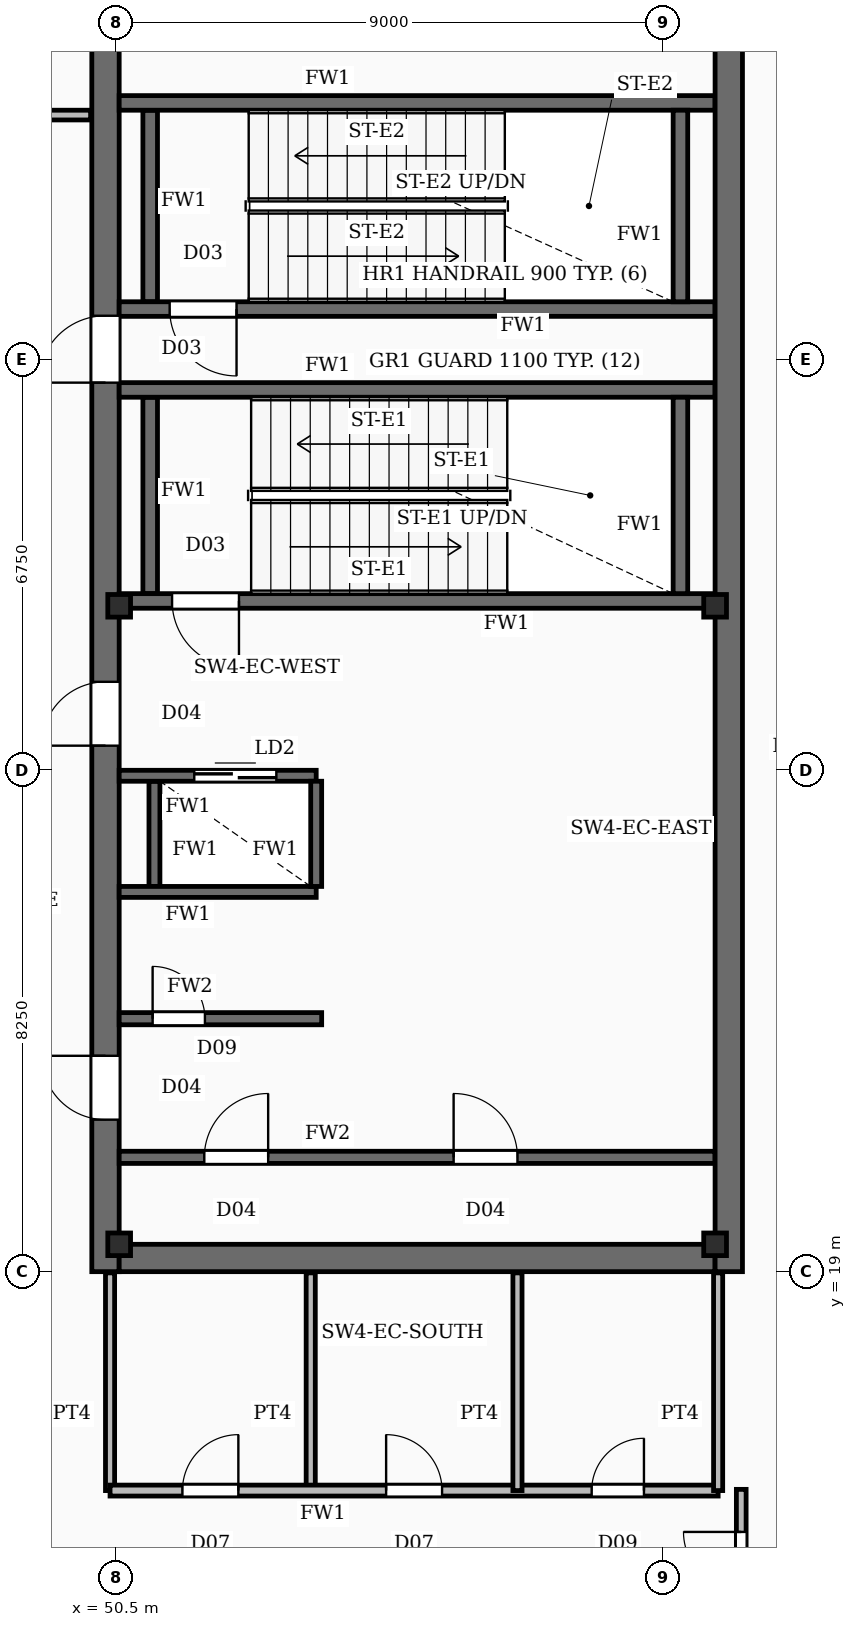
"""IFC4 building model, lengths in metres.
Left out: names, types, materials, properties, quantities, classifications, styles, units other than length and angle.
Written with IfcOpenShell. Run it as: python <this file> out.ifc"""

import sys

from ifc_helpers import new_model, si_unit, direction, frame, frame_2d, origin, origin_2d, place, context, subcontext, project, spatial, rectangle, i_section, extrude, element, fill, save


model = new_model("IFC4")
c1 = context("Model", 3, precision=1e-05, world=origin(), true_north=direction((0.0, 1.0)))
c2 = subcontext(c1, "Body", "Model", "MODEL_VIEW")
j1 = project(units=[si_unit("LENGTHUNIT", "METRE"), si_unit("PLANEANGLEUNIT", "RADIAN")], contexts=[c1])
p1 = place(None, origin())
s1 = spatial("IfcSite", under=j1, at=p1, CompositionType="ELEMENT")
p2 = place(p1, origin())
s2 = spatial("IfcBuilding", under=s1, at=p2, CompositionType="ELEMENT")
p3 = place(p2, frame((0.0, 0.0, 317.2)))
s3 = spatial("IfcBuildingStorey", under=s2, at=p3, CompositionType="ELEMENT", Elevation=317.2)
p4 = place(p3, frame((50.325, 19.0, -0.24), z_axis=(0.0, 0.0, 1.0), x_axis=(0.0, 1.0, 0.0)))
e1 = element("IfcWall", 1, at=p4, inside=s3, PredefinedType="SHEAR", context=c2, shape_type="SweptSolid", body=[
    extrude(rectangle(XDim=20.8, YDim=0.45, at=frame_2d((10.4, 0.0))), origin(), (0.0, 0.0, 1.0), 4.62),
])
p5 = place(p4, frame((2.5, 0.0, 0.24)))
e2 = element("IfcOpeningElement", 2, at=p5, cuts=e1, PredefinedType="OPENING", context=c2, shape_type="SweptSolid", body=[
    extrude(rectangle(XDim=1.05, YDim=2.15, at=frame_2d((0.525, 1.075))), frame((0.0, 0.235, 0.0), z_axis=(0.0, -1.0, 0.0), x_axis=(1.0, 0.0, 0.0)), (0.0, 0.0, 1.0), 0.47),
])
p6 = place(p4, frame((8.65, 0.0, 0.24)))
e3 = element("IfcOpeningElement", 3, at=p6, cuts=e1, PredefinedType="OPENING", context=c2, shape_type="SweptSolid", body=[
    extrude(rectangle(XDim=1.05, YDim=2.15, at=frame_2d((0.525, 1.075))), frame((0.0, 0.235, 0.0), z_axis=(0.0, -1.0, 0.0), x_axis=(1.0, 0.0, 0.0)), (0.0, 0.0, 1.0), 0.47),
])
p7 = place(p4, frame((14.62, 0.0, 0.24)))
e4 = element("IfcOpeningElement", 4, at=p7, cuts=e1, PredefinedType="OPENING", context=c2, shape_type="SweptSolid", body=[
    extrude(rectangle(XDim=1.1, YDim=2.15, at=frame_2d((0.55, 1.075))), frame((0.0, 0.235, 0.0), z_axis=(0.0, -1.0, 0.0), x_axis=(1.0, 0.0, 0.0)), (0.0, 0.0, 1.0), 0.47),
])
p8 = place(p3, frame((60.575, 19.0, -0.24), z_axis=(0.0, 0.0, 1.0), x_axis=(0.0, 1.0, 0.0)))
e5 = element("IfcWall", 5, at=p8, inside=s3, PredefinedType="SHEAR", context=c2, shape_type="SweptSolid", body=[
    extrude(rectangle(XDim=20.8, YDim=0.45, at=frame_2d((10.4, 0.0))), origin(), (0.0, 0.0, 1.0), 4.62),
])
p9 = place(p3, frame((50.55, 19.225, -0.24), z_axis=(0.0, 0.0, 1.0), x_axis=(1.0, 0.0, 0.0)))
e6 = element("IfcWall", 6, at=p9, inside=s3, PredefinedType="SHEAR", context=c2, shape_type="SweptSolid", body=[
    extrude(rectangle(XDim=9.8, YDim=0.45, at=frame_2d((4.9, 0.0))), origin(), (0.0, 0.0, 1.0), 4.62),
])
for number, where, z_axis, x_axis in (
    (7, (50.55, 19.45, -0.24), (0.0, 0.0, 1.0), (1.0, 0.0, 0.0)),
    (8, (60.35, 19.45, -0.24), (0.0, 0.0, 1.0), (1.0, 0.0, 0.0)),
    (9, (50.55, 29.95, -0.24), (0.0, 0.0, 1.0), (1.0, 0.0, 0.0)),
    (10, (60.35, 29.95, -0.24), (0.0, 0.0, 1.0), (1.0, 0.0, 0.0)),
):
    element("IfcColumn", number, at=place(p3, frame(where, z_axis=z_axis, x_axis=x_axis)), inside=s3, PredefinedType="COLUMN", context=c2, shape_type="SweptSolid", body=[
        extrude(i_section(OverallWidth=0.374, OverallDepth=0.372, WebThickness=0.016, FlangeThickness=0.026, FilletRadius=0.02, at=origin_2d()), origin(), (0.0, 0.0, 1.0), 4.62),
    ])
p10 = place(p3, frame((60.35, 30.03, 0.0), z_axis=(0.0, 0.0, 1.0), x_axis=(-1.0, 0.0, 0.0)))
e11 = element("IfcWall", 11, at=p10, inside=s3, PredefinedType="SOLIDWALL", context=c2, shape_type="SweptSolid", body=[
    extrude(rectangle(XDim=9.8, YDim=0.24, at=frame_2d((4.9, 0.0))), origin(), (0.0, 0.0, 1.0), 4.38),
])
p11 = place(p10, frame((7.83, 0.0, 0.0)))
e12 = element("IfcOpeningElement", 12, at=p11, cuts=e11, PredefinedType="OPENING", context=c2, shape_type="SweptSolid", body=[
    extrude(rectangle(XDim=1.1, YDim=2.15, at=frame_2d((0.55, 1.075))), frame((0.0, 0.13, 0.0), z_axis=(0.0, -1.0, 0.0), x_axis=(1.0, 0.0, 0.0)), (0.0, 0.0, 1.0), 0.26),
])
p12 = place(p3, frame((50.55, 33.5, 0.0), z_axis=(0.0, 0.0, 1.0), x_axis=(1.0, 0.0, 0.0)))
e13 = element("IfcWall", 13, at=p12, inside=s3, PredefinedType="SOLIDWALL", context=c2, shape_type="SweptSolid", body=[
    extrude(rectangle(XDim=9.8, YDim=0.24, at=frame_2d((4.9, 0.0))), origin(), (0.0, 0.0, 1.0), 4.38),
])
for number, where, z_axis, x_axis in (
    (14, (51.06, 30.15, 0.0), (0.0, 0.0, 1.0), (0.0, 1.0, 0.0)),
    (15, (59.78, 30.15, 0.0), (0.0, 0.0, 1.0), (0.0, 1.0, 0.0)),
):
    element("IfcWall", number, at=place(p3, frame(where, z_axis=z_axis, x_axis=x_axis)), inside=s3, PredefinedType="SOLIDWALL", context=c2, shape_type="SweptSolid", body=[
        extrude(rectangle(XDim=3.23, YDim=0.24, at=frame_2d((1.615, 0.0))), origin(), (0.0, 0.0, 1.0), 4.38),
    ])
p13 = place(p3, frame((60.35, 34.83, 0.0), z_axis=(0.0, 0.0, 1.0), x_axis=(-1.0, 0.0, 0.0)))
e16 = element("IfcWall", 16, at=p13, inside=s3, PredefinedType="SOLIDWALL", context=c2, shape_type="SweptSolid", body=[
    extrude(rectangle(XDim=9.8, YDim=0.24, at=frame_2d((4.9, 0.0))), origin(), (0.0, 0.0, 1.0), 4.38),
])
p14 = place(p13, frame((7.87, 0.0, 0.0)))
e17 = element("IfcOpeningElement", 17, at=p14, cuts=e16, PredefinedType="OPENING", context=c2, shape_type="SweptSolid", body=[
    extrude(rectangle(XDim=1.1, YDim=2.15, at=frame_2d((0.55, 1.075))), frame((0.0, 0.13, 0.0), z_axis=(0.0, -1.0, 0.0), x_axis=(1.0, 0.0, 0.0)), (0.0, 0.0, 1.0), 0.26),
])
p15 = place(p3, frame((50.55, 38.22, 0.0), z_axis=(0.0, 0.0, 1.0), x_axis=(1.0, 0.0, 0.0)))
e18 = element("IfcWall", 18, at=p15, inside=s3, PredefinedType="SOLIDWALL", context=c2, shape_type="SweptSolid", body=[
    extrude(rectangle(XDim=9.8, YDim=0.24, at=frame_2d((4.9, 0.0))), origin(), (0.0, 0.0, 1.0), 4.38),
])
for number, where, z_axis, x_axis in (
    (19, (51.06, 34.95, 0.0), (0.0, 0.0, 1.0), (0.0, 1.0, 0.0)),
    (20, (59.78, 34.95, 0.0), (0.0, 0.0, 1.0), (0.0, 1.0, 0.0)),
):
    element("IfcWall", number, at=place(p3, frame(where, z_axis=z_axis, x_axis=x_axis)), inside=s3, PredefinedType="SOLIDWALL", context=c2, shape_type="SweptSolid", body=[
        extrude(rectangle(XDim=3.15, YDim=0.24, at=frame_2d((1.575, 0.0))), origin(), (0.0, 0.0, 1.0), 4.38),
    ])
p16 = place(p3, frame((50.55, 27.155, 0.0), z_axis=(0.0, 0.0, 1.0), x_axis=(1.0, 0.0, 0.0)))
e21 = element("IfcWall", 21, at=p16, inside=s3, PredefinedType="SOLIDWALL", context=c2, shape_type="SweptSolid", body=[
    extrude(rectangle(XDim=3.24, YDim=0.18, at=frame_2d((1.62, 0.0))), origin(), (0.0, 0.0, 1.0), 4.38),
])
p17 = place(p16, frame((1.235, 0.0, 0.0)))
e22 = element("IfcOpeningElement", 22, at=p17, cuts=e21, PredefinedType="OPENING", context=c2, shape_type="SweptSolid", body=[
    extrude(rectangle(XDim=1.35, YDim=2.3, at=frame_2d((0.675, 1.15))), frame((0.0, 0.1, 0.0), z_axis=(0.0, -1.0, 0.0), x_axis=(1.0, 0.0, 0.0)), (0.0, 0.0, 1.0), 0.2),
])
p18 = place(p3, frame((50.55, 25.245, 0.0), z_axis=(0.0, 0.0, 1.0), x_axis=(1.0, 0.0, 0.0)))
e23 = element("IfcWall", 23, at=p18, inside=s3, PredefinedType="SOLIDWALL", context=c2, shape_type="SweptSolid", body=[
    extrude(rectangle(XDim=3.24, YDim=0.18, at=frame_2d((1.62, 0.0))), origin(), (0.0, 0.0, 1.0), 4.38),
])
for number, where, z_axis, x_axis in (
    (24, (51.13, 25.335, 0.0), (0.0, 0.0, 1.0), (0.0, 1.0, 0.0)),
    (25, (53.79, 25.335, 0.0), (0.0, 0.0, 1.0), (0.0, 1.0, 0.0)),
):
    element("IfcWall", number, at=place(p3, frame(where, z_axis=z_axis, x_axis=x_axis)), inside=s3, PredefinedType="SOLIDWALL", context=c2, shape_type="SweptSolid", body=[
        extrude(rectangle(XDim=1.73, YDim=0.18, at=frame_2d((0.865, 0.0))), origin(), (0.0, 0.0, 1.0), 4.38),
    ])
p19 = place(p3, frame((50.55, 20.88, 0.0), z_axis=(0.0, 0.0, 1.0), x_axis=(1.0, 0.0, 0.0)))
e26 = element("IfcWall", 26, at=p19, inside=s3, PredefinedType="SOLIDWALL", context=c2, shape_type="SweptSolid", body=[
    extrude(rectangle(XDim=9.8, YDim=0.2, at=frame_2d((4.9, 0.0))), origin(), (0.0, 0.0, 1.0), 3.44),
])
p20 = place(p19, frame((1.4, 0.0, 0.0)))
e27 = element("IfcOpeningElement", 27, at=p20, cuts=e26, PredefinedType="OPENING", context=c2, shape_type="SweptSolid", body=[
    extrude(rectangle(XDim=1.05, YDim=2.15, at=frame_2d((0.525, 1.075))), frame((0.0, 0.11, 0.0), z_axis=(0.0, -1.0, 0.0), x_axis=(1.0, 0.0, 0.0)), (0.0, 0.0, 1.0), 0.22),
])
p21 = place(p19, frame((5.5, 0.0, 0.0)))
e28 = element("IfcOpeningElement", 28, at=p21, cuts=e26, PredefinedType="OPENING", context=c2, shape_type="SweptSolid", body=[
    extrude(rectangle(XDim=1.05, YDim=2.15, at=frame_2d((0.525, 1.075))), frame((0.0, 0.11, 0.0), z_axis=(0.0, -1.0, 0.0), x_axis=(1.0, 0.0, 0.0)), (0.0, 0.0, 1.0), 0.22),
])
p22 = place(p3, frame((50.55, 23.16, 0.0), z_axis=(0.0, 0.0, 1.0), x_axis=(1.0, 0.0, 0.0)))
e29 = element("IfcWall", 29, at=p22, inside=s3, PredefinedType="SOLIDWALL", context=c2, shape_type="SweptSolid", body=[
    extrude(rectangle(XDim=3.33, YDim=0.2, at=frame_2d((1.665, 0.0))), origin(), (0.0, 0.0, 1.0), 3.44),
])
p23 = place(p22, frame((0.55, 0.0, 0.0)))
e30 = element("IfcOpeningElement", 30, at=p23, cuts=e29, PredefinedType="OPENING", context=c2, shape_type="SweptSolid", body=[
    extrude(rectangle(XDim=0.86, YDim=2.05, at=frame_2d((0.43, 1.025))), frame((0.0, 0.11, 0.0), z_axis=(0.0, -1.0, 0.0), x_axis=(1.0, 0.0, 0.0)), (0.0, 0.0, 1.0), 0.22),
])
for number, where, z_axis, x_axis in (
    (31, (53.7, 15.4, 0.0), (0.0, 0.0, 1.0), (0.0, 1.0, 0.0)),
    (32, (57.1, 15.4, 0.0), (0.0, 0.0, 1.0), (0.0, 1.0, 0.0)),
):
    element("IfcWall", number, at=place(p3, frame(where, z_axis=z_axis, x_axis=x_axis)), inside=s3, PredefinedType="PARTITIONING", context=c2, shape_type="SweptSolid", body=[
        extrude(rectangle(XDim=3.58, YDim=0.15, at=frame_2d((1.79, 0.0))), origin(), (0.0, 0.0, 1.0), 3.44),
    ])
p24 = place(p3, frame((50.4, 15.4, 0.0), z_axis=(0.0, 0.0, 1.0), x_axis=(1.0, 0.0, 0.0)))
e33 = element("IfcWall", 33, at=p24, inside=s3, PredefinedType="SOLIDWALL", context=c2, shape_type="SweptSolid", body=[
    extrude(rectangle(XDim=10.0, YDim=0.18, at=frame_2d((5.0, 0.0))), origin(), (0.0, 0.0, 1.0), 3.44),
])
p25 = place(p24, frame((1.19, 0.0, 0.0)))
e34 = element("IfcOpeningElement", 34, at=p25, cuts=e33, PredefinedType="OPENING", context=c2, shape_type="SweptSolid", body=[
    extrude(rectangle(XDim=0.92, YDim=2.1, at=frame_2d((0.46, 1.05))), frame((0.0, 0.1, 0.0), z_axis=(0.0, -1.0, 0.0), x_axis=(1.0, 0.0, 0.0)), (0.0, 0.0, 1.0), 0.2),
])
p26 = place(p24, frame((4.54, 0.0, 0.0)))
e35 = element("IfcOpeningElement", 35, at=p26, cuts=e33, PredefinedType="OPENING", context=c2, shape_type="SweptSolid", body=[
    extrude(rectangle(XDim=0.92, YDim=2.1, at=frame_2d((0.46, 1.05))), frame((0.0, 0.1, 0.0), z_axis=(0.0, -1.0, 0.0), x_axis=(1.0, 0.0, 0.0)), (0.0, 0.0, 1.0), 0.2),
])
p27 = place(p24, frame((7.92, 0.0, 0.0)))
e36 = element("IfcOpeningElement", 36, at=p27, cuts=e33, PredefinedType="OPENING", context=c2, shape_type="SweptSolid", body=[
    extrude(rectangle(XDim=0.86, YDim=2.05, at=frame_2d((0.43, 1.025))), frame((0.0, 0.1, 0.0), z_axis=(0.0, -1.0, 0.0), x_axis=(1.0, 0.0, 0.0)), (0.0, 0.0, 1.0), 0.2),
])
for number, where, z_axis, x_axis in (
    (37, (50.4, 15.4, 0.0), (0.0, 0.0, 1.0), (0.0, 1.0, 0.0)),
    (38, (60.4, 15.4, 0.0), (0.0, 0.0, 1.0), (0.0, 1.0, 0.0)),
):
    element("IfcWall", number, at=place(p3, frame(where, z_axis=z_axis, x_axis=x_axis)), inside=s3, PredefinedType="PARTITIONING", context=c2, shape_type="SweptSolid", body=[
        extrude(rectangle(XDim=3.58, YDim=0.15, at=frame_2d((1.79, 0.0))), origin(), (0.0, 0.0, 1.0), 3.44),
    ])
p28 = place(p3, frame((24.82, 38.02, 0.0), z_axis=(0.0, 0.0, 1.0), x_axis=(1.0, 0.0, 0.0)))
e39 = element("IfcWall", 39, at=p28, inside=s3, PredefinedType="PARTITIONING", context=c2, shape_type="SweptSolid", body=[
    extrude(rectangle(XDim=25.26, YDim=0.16, at=frame_2d((12.63, 0.0))), origin(), (0.0, 0.0, 1.0), 3.44),
])
p29 = place(p28, frame((3.5, 0.0, 0.0)))
e40 = element("IfcOpeningElement", 40, at=p29, cuts=e39, PredefinedType="OPENING", context=c2, shape_type="SweptSolid", body=[
    extrude(rectangle(XDim=1.6, YDim=2.15, at=frame_2d((0.8, 1.075))), frame((0.0, 0.09, 0.0), z_axis=(0.0, -1.0, 0.0), x_axis=(1.0, 0.0, 0.0)), (0.0, 0.0, 1.0), 0.18),
])
p30 = place(p28, frame((17.5, 0.0, 0.0)))
e41 = element("IfcOpeningElement", 41, at=p30, cuts=e39, PredefinedType="OPENING", context=c2, shape_type="SweptSolid", body=[
    extrude(rectangle(XDim=1.6, YDim=2.15, at=frame_2d((0.8, 1.075))), frame((0.0, 0.09, 0.0), z_axis=(0.0, -1.0, 0.0), x_axis=(1.0, 0.0, 0.0)), (0.0, 0.0, 1.0), 0.18),
])
p31 = place(p3, frame((60.78, 13.12, 0.0), z_axis=(0.0, 0.0, 1.0), x_axis=(0.0, 1.0, 0.0)))
e42 = element("IfcWall", 42, at=p31, inside=s3, PredefinedType="PARTITIONING", context=c2, shape_type="SweptSolid", body=[
    extrude(rectangle(XDim=2.3, YDim=0.16, at=frame_2d((1.15, 0.0))), origin(), (0.0, 0.0, 1.0), 3.44),
])
p32 = place(p31, frame((0.65, 0.0, 0.0)))
e43 = element("IfcOpeningElement", 43, at=p32, cuts=e42, PredefinedType="OPENING", context=c2, shape_type="SweptSolid", body=[
    extrude(rectangle(XDim=0.95, YDim=2.15, at=frame_2d((0.475, 1.075))), frame((0.0, 0.09, 0.0), z_axis=(0.0, -1.0, 0.0), x_axis=(1.0, 0.0, 0.0)), (0.0, 0.0, 1.0), 0.18),
])
p33 = place(p5, origin())
e44 = element("IfcDoor", 44, at=p33, inside=s3, OperationType="SINGLE_SWING_RIGHT", PredefinedType="DOOR", context=c2, shape_type="SweptSolid", body=[
    extrude(rectangle(XDim=1.05, YDim=2.15, at=frame_2d((0.525, 1.075))), frame((0.0, 0.025, 0.0), z_axis=(0.0, -1.0, 0.0), x_axis=(1.0, 0.0, 0.0)), (0.0, 0.0, 1.0), 0.05),
])
fill(e2, e44)
p34 = place(p6, origin())
e45 = element("IfcDoor", 45, at=p34, inside=s3, OperationType="SINGLE_SWING_LEFT", PredefinedType="DOOR", context=c2, shape_type="SweptSolid", body=[
    extrude(rectangle(XDim=1.05, YDim=2.15, at=frame_2d((0.525, 1.075))), frame((0.0, 0.025, 0.0), z_axis=(0.0, -1.0, 0.0), x_axis=(1.0, 0.0, 0.0)), (0.0, 0.0, 1.0), 0.05),
])
fill(e3, e45)
p35 = place(p7, origin())
e46 = element("IfcDoor", 46, at=p35, inside=s3, OperationType="SINGLE_SWING_LEFT", PredefinedType="DOOR", context=c2, shape_type="SweptSolid", body=[
    extrude(rectangle(XDim=1.1, YDim=2.15, at=frame_2d((0.55, 1.075))), frame((0.0, 0.025, 0.0), z_axis=(0.0, -1.0, 0.0), x_axis=(1.0, 0.0, 0.0)), (0.0, 0.0, 1.0), 0.05),
])
fill(e4, e46)
p36 = place(p11, origin())
e47 = element("IfcDoor", 47, at=p36, inside=s3, OperationType="SINGLE_SWING_LEFT", PredefinedType="DOOR", context=c2, shape_type="SweptSolid", body=[
    extrude(rectangle(XDim=1.1, YDim=2.15, at=frame_2d((0.55, 1.075))), frame((0.0, 0.025, 0.0), z_axis=(0.0, -1.0, 0.0), x_axis=(1.0, 0.0, 0.0)), (0.0, 0.0, 1.0), 0.05),
])
fill(e12, e47)
p37 = place(p14, origin())
e48 = element("IfcDoor", 48, at=p37, inside=s3, OperationType="SINGLE_SWING_LEFT", PredefinedType="DOOR", context=c2, shape_type="SweptSolid", body=[
    extrude(rectangle(XDim=1.1, YDim=2.15, at=frame_2d((0.55, 1.075))), frame((0.0, 0.025, 0.0), z_axis=(0.0, -1.0, 0.0), x_axis=(1.0, 0.0, 0.0)), (0.0, 0.0, 1.0), 0.05),
])
fill(e17, e48)
p38 = place(p17, origin())
e49 = element("IfcDoor", 49, at=p38, inside=s3, OperationType="DOUBLE_DOOR_SLIDING", PredefinedType="DOOR", context=c2, shape_type="SweptSolid", body=[
    extrude(rectangle(XDim=1.35, YDim=2.3, at=frame_2d((0.675, 1.15))), frame((0.0, 0.025, 0.0), z_axis=(0.0, -1.0, 0.0), x_axis=(1.0, 0.0, 0.0)), (0.0, 0.0, 1.0), 0.05),
])
fill(e22, e49)
p39 = place(p20, origin())
e50 = element("IfcDoor", 50, at=p39, inside=s3, OperationType="SINGLE_SWING_RIGHT", PredefinedType="DOOR", context=c2, shape_type="SweptSolid", body=[
    extrude(rectangle(XDim=1.05, YDim=2.15, at=frame_2d((0.525, 1.075))), frame((0.0, 0.025, 0.0), z_axis=(0.0, -1.0, 0.0), x_axis=(1.0, 0.0, 0.0)), (0.0, 0.0, 1.0), 0.05),
])
fill(e27, e50)
p40 = place(p21, origin())
e51 = element("IfcDoor", 51, at=p40, inside=s3, OperationType="SINGLE_SWING_LEFT", PredefinedType="DOOR", context=c2, shape_type="SweptSolid", body=[
    extrude(rectangle(XDim=1.05, YDim=2.15, at=frame_2d((0.525, 1.075))), frame((0.0, 0.025, 0.0), z_axis=(0.0, -1.0, 0.0), x_axis=(1.0, 0.0, 0.0)), (0.0, 0.0, 1.0), 0.05),
])
fill(e28, e51)
p41 = place(p23, origin())
e52 = element("IfcDoor", 52, at=p41, inside=s3, OperationType="SINGLE_SWING_LEFT", PredefinedType="DOOR", context=c2, shape_type="SweptSolid", body=[
    extrude(rectangle(XDim=0.86, YDim=2.05, at=frame_2d((0.43, 1.025))), frame((0.0, 0.025, 0.0), z_axis=(0.0, -1.0, 0.0), x_axis=(1.0, 0.0, 0.0)), (0.0, 0.0, 1.0), 0.05),
])
fill(e30, e52)
p42 = place(p25, origin())
e53 = element("IfcDoor", 53, at=p42, inside=s3, OperationType="SINGLE_SWING_RIGHT", PredefinedType="DOOR", context=c2, shape_type="SweptSolid", body=[
    extrude(rectangle(XDim=0.92, YDim=2.1, at=frame_2d((0.46, 1.05))), frame((0.0, 0.025, 0.0), z_axis=(0.0, -1.0, 0.0), x_axis=(1.0, 0.0, 0.0)), (0.0, 0.0, 1.0), 0.05),
])
fill(e34, e53)
p43 = place(p26, origin())
e54 = element("IfcDoor", 54, at=p43, inside=s3, OperationType="SINGLE_SWING_LEFT", PredefinedType="DOOR", context=c2, shape_type="SweptSolid", body=[
    extrude(rectangle(XDim=0.92, YDim=2.1, at=frame_2d((0.46, 1.05))), frame((0.0, 0.025, 0.0), z_axis=(0.0, -1.0, 0.0), x_axis=(1.0, 0.0, 0.0)), (0.0, 0.0, 1.0), 0.05),
])
fill(e35, e54)
p44 = place(p27, origin())
e55 = element("IfcDoor", 55, at=p44, inside=s3, OperationType="SINGLE_SWING_RIGHT", PredefinedType="DOOR", context=c2, shape_type="SweptSolid", body=[
    extrude(rectangle(XDim=0.86, YDim=2.05, at=frame_2d((0.43, 1.025))), frame((0.0, 0.025, 0.0), z_axis=(0.0, -1.0, 0.0), x_axis=(1.0, 0.0, 0.0)), (0.0, 0.0, 1.0), 0.05),
])
fill(e36, e55)
p45 = place(p32, origin())
e56 = element("IfcDoor", 56, at=p45, inside=s3, OperationType="SINGLE_SWING_RIGHT", PredefinedType="DOOR", context=c2, shape_type="SweptSolid", body=[
    extrude(rectangle(XDim=0.95, YDim=2.15, at=frame_2d((0.475, 1.075))), frame((0.0, 0.025, 0.0), z_axis=(0.0, -1.0, 0.0), x_axis=(1.0, 0.0, 0.0)), (0.0, 0.0, 1.0), 0.05),
])
fill(e43, e56)
save(model, sys.argv[1])
